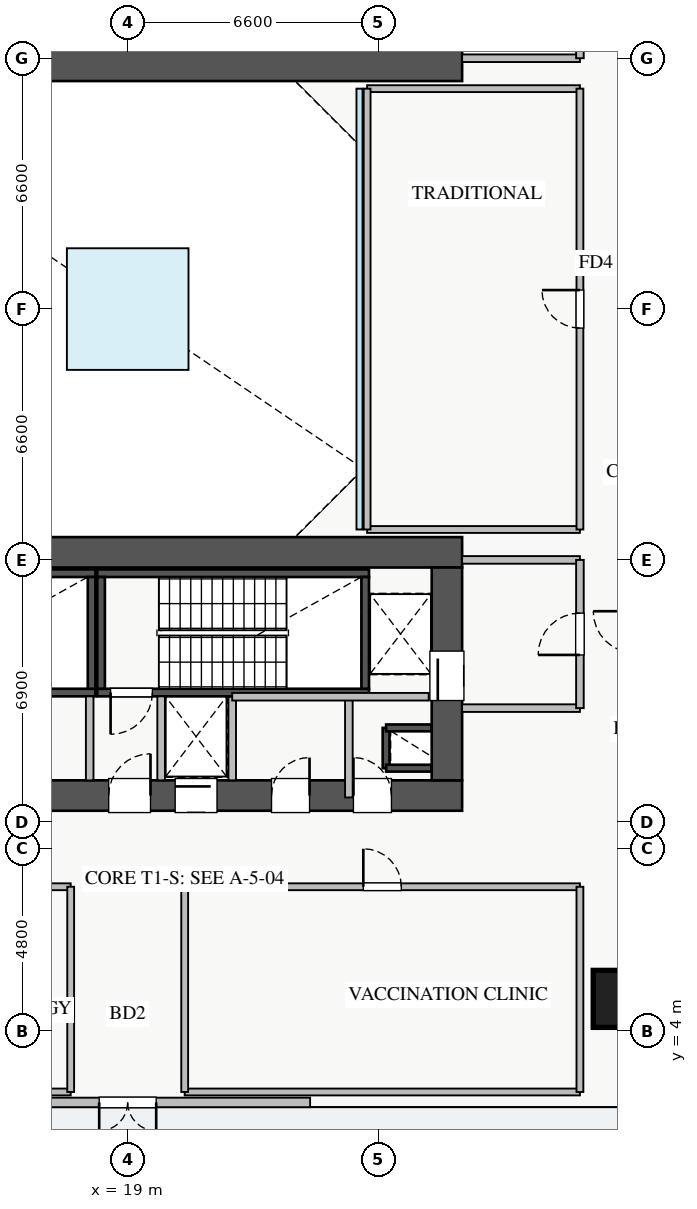
"""IFC4 building model, lengths in metres.
Left out: names, types, materials, properties, quantities, classifications, styles, units other than length and angle.
Written with IfcOpenShell. Run it as: python <this file> out.ifc"""

import sys

from ifc_helpers import new_model, si_unit, direction, frame, frame_2d, origin, origin_2d, place, context, subcontext, project, spatial, rectangle, extrude, source, transform, mapped, element, fill, save


model = new_model("IFC4")
c1 = context("Model", 3, precision=1e-05, world=origin(), true_north=direction((0.0, 1.0)))
c2 = subcontext(c1, "Body", "Model", "MODEL_VIEW")
j1 = project(units=[si_unit("LENGTHUNIT", "METRE"), si_unit("PLANEANGLEUNIT", "RADIAN")], contexts=[c1])
p1 = place(None, origin())
s1 = spatial("IfcSite", under=j1, at=p1, CompositionType="ELEMENT")
p2 = place(p1, origin())
s2 = spatial("IfcBuilding", under=s1, at=p2, CompositionType="ELEMENT")
p3 = place(p2, frame((0.0, 0.0, 5.0)))
s3 = spatial("IfcBuildingStorey", under=s2, at=p3, CompositionType="ELEMENT", Elevation=5.0)
p4 = place(p3, frame((25.8, 10.92, 0.0), z_axis=(0.0, 0.0, 1.0), x_axis=(0.0, 1.0, 0.0)))
e1 = element("IfcWall", 1, at=p4, inside=s3, PredefinedType="SHEAR", context=c2, shape_type="SweptSolid", body=[
    extrude(rectangle(XDim=1.06, YDim=0.18, at=frame_2d((0.53, 0.0))), origin(), (0.0, 0.0, 1.0), 4.18),
])
for number, where, z_axis, x_axis in (
    (2, (25.8, 11.98, 0.0), (0.0, 0.0, 1.0), (1.0, 0.0, 0.0)),
    (3, (25.8, 10.92, 0.0), (0.0, 0.0, 1.0), (1.0, 0.0, 0.0)),
):
    element("IfcWall", number, at=place(p3, frame(where, z_axis=z_axis, x_axis=x_axis)), inside=s3, PredefinedType="SHEAR", context=c2, shape_type="SweptSolid", body=[
        extrude(rectangle(XDim=1.2, YDim=0.18, at=frame_2d((0.6, 0.0))), origin(), (0.0, 0.0, 1.0), 4.18),
    ])
p5 = place(p3, frame((19.88, 12.8, 0.0), z_axis=(0.0, 0.0, 1.0), x_axis=(1.0, 0.0, 0.0)))
e4 = element("IfcWall", 4, at=p5, inside=s3, PredefinedType="SHEAR", context=c2, shape_type="SweptSolid", body=[
    extrude(rectangle(XDim=1.87, YDim=0.18, at=frame_2d((0.935, 0.0))), origin(), (0.0, 0.0, 1.0), 4.18),
])
p6 = place(p3, frame((11.0, 12.91, 0.0), z_axis=(0.0, 0.0, 1.0), x_axis=(1.0, 0.0, 0.0)))
e5 = element("IfcWall", 5, at=p6, inside=s3, PredefinedType="SHEAR", context=c2, shape_type="SweptSolid", body=[
    extrude(rectangle(XDim=7.15, YDim=0.2, at=frame_2d((3.575, 0.0))), origin(), (0.0, 0.0, 1.0), 4.4),
])
p7 = place(p6, frame((0.35, 0.0, 0.0)))
e6 = element("IfcOpeningElement", 6, at=p7, cuts=e5, PredefinedType="OPENING", context=c2, shape_type="SweptSolid", body=[
    extrude(rectangle(XDim=1.1, YDim=2.05, at=frame_2d((0.55, 1.025))), frame((0.0, 0.11, 0.0), z_axis=(0.0, -1.0, 0.0), x_axis=(1.0, 0.0, 0.0)), (0.0, 0.0, 1.0), 0.22),
])
p8 = place(p3, frame((11.0, 16.05, 0.0), z_axis=(0.0, 0.0, 1.0), x_axis=(1.0, 0.0, 0.0)))
e7 = element("IfcWall", 7, at=p8, inside=s3, PredefinedType="SHEAR", context=c2, shape_type="SweptSolid", body=[
    extrude(rectangle(XDim=7.15, YDim=0.2, at=frame_2d((3.575, 0.0))), origin(), (0.0, 0.0, 1.0), 4.4),
])
p9 = place(p3, frame((18.05, 13.01, 0.0), z_axis=(0.0, 0.0, 1.0), x_axis=(0.0, 1.0, 0.0)))
e8 = element("IfcWall", 8, at=p9, inside=s3, PredefinedType="SHEAR", context=c2, shape_type="SweptSolid", body=[
    extrude(rectangle(XDim=2.94, YDim=0.2, at=frame_2d((1.47, 0.0))), origin(), (0.0, 0.0, 1.0), 4.4),
])
p10 = place(p3, frame((18.2, 12.91, 0.0), z_axis=(0.0, 0.0, 1.0), x_axis=(1.0, 0.0, 0.0)))
e9 = element("IfcWall", 9, at=p10, inside=s3, PredefinedType="SHEAR", context=c2, shape_type="SweptSolid", body=[
    extrude(rectangle(XDim=7.15, YDim=0.2, at=frame_2d((3.575, 0.0))), origin(), (0.0, 0.0, 1.0), 4.4),
])
p11 = place(p10, frame((0.35, 0.0, 0.0)))
e10 = element("IfcOpeningElement", 10, at=p11, cuts=e9, PredefinedType="OPENING", context=c2, shape_type="SweptSolid", body=[
    extrude(rectangle(XDim=1.1, YDim=2.05, at=frame_2d((0.55, 1.025))), frame((0.0, 0.11, 0.0), z_axis=(0.0, -1.0, 0.0), x_axis=(1.0, 0.0, 0.0)), (0.0, 0.0, 1.0), 0.22),
])
p12 = place(p3, frame((18.2, 16.05, 0.0), z_axis=(0.0, 0.0, 1.0), x_axis=(1.0, 0.0, 0.0)))
e11 = element("IfcWall", 11, at=p12, inside=s3, PredefinedType="SHEAR", context=c2, shape_type="SweptSolid", body=[
    extrude(rectangle(XDim=7.15, YDim=0.2, at=frame_2d((3.575, 0.0))), origin(), (0.0, 0.0, 1.0), 4.4),
])
for number, where, z_axis, x_axis in (
    (12, (18.3, 13.01, 0.0), (0.0, 0.0, 1.0), (0.0, 1.0, 0.0)),
    (13, (25.25, 13.01, 0.0), (0.0, 0.0, 1.0), (0.0, 1.0, 0.0)),
):
    element("IfcWall", number, at=place(p3, frame(where, z_axis=z_axis, x_axis=x_axis)), inside=s3, PredefinedType="SHEAR", context=c2, shape_type="SweptSolid", body=[
        extrude(rectangle(XDim=2.94, YDim=0.2, at=frame_2d((1.47, 0.0))), origin(), (0.0, 0.0, 1.0), 4.4),
    ])
p13 = place(p3, frame((10.2, 29.4, 0.0), z_axis=(0.0, 0.0, 1.0), x_axis=(1.0, 0.0, 0.0)))
e14 = element("IfcWall", 14, at=p13, inside=s3, PredefinedType="SHEAR", context=c2, shape_type="SweptSolid", body=[
    extrude(rectangle(XDim=17.6, YDim=0.8, at=frame_2d((8.8, 0.0))), origin(), (0.0, 0.0, 1.0), 4.4),
])
p14 = place(p3, frame((10.2, 10.2, 0.0), z_axis=(0.0, 0.0, 1.0), x_axis=(1.0, 0.0, 0.0)))
e15 = element("IfcWall", 15, at=p14, inside=s3, PredefinedType="SHEAR", context=c2, shape_type="SweptSolid", body=[
    extrude(rectangle(XDim=17.6, YDim=0.8, at=frame_2d((8.8, 0.0))), origin(), (0.0, 0.0, 1.0), 4.4),
])
p15 = place(p14, frame((1.15, 0.0, 0.0)))
e16 = element("IfcOpeningElement", 16, at=p15, cuts=e15, PredefinedType="OPENING", context=c2, shape_type="SweptSolid", body=[
    extrude(rectangle(XDim=1.1, YDim=2.05, at=frame_2d((0.55, 1.025))), frame((0.0, 0.41, 0.0), z_axis=(0.0, -1.0, 0.0), x_axis=(1.0, 0.0, 0.0)), (0.0, 0.0, 1.0), 0.82),
])
p16 = place(p14, frame((8.3, 0.0, 0.0)))
e17 = element("IfcOpeningElement", 17, at=p16, cuts=e15, PredefinedType="OPENING", context=c2, shape_type="SweptSolid", body=[
    extrude(rectangle(XDim=1.1, YDim=2.05, at=frame_2d((0.55, 1.025))), frame((0.0, 0.41, 0.0), z_axis=(0.0, -1.0, 0.0), x_axis=(1.0, 0.0, 0.0)), (0.0, 0.0, 1.0), 0.82),
])
p17 = place(p14, frame((10.05, 0.0, 0.0)))
e18 = element("IfcOpeningElement", 18, at=p17, cuts=e15, PredefinedType="OPENING", context=c2, shape_type="SweptSolid", body=[
    extrude(rectangle(XDim=1.1, YDim=2.05, at=frame_2d((0.55, 1.025))), frame((0.0, 0.41, 0.0), z_axis=(0.0, -1.0, 0.0), x_axis=(1.0, 0.0, 0.0)), (0.0, 0.0, 1.0), 0.82),
])
p18 = place(p14, frame((14.74, 0.0, 0.0)))
e19 = element("IfcOpeningElement", 19, at=p18, cuts=e15, PredefinedType="OPENING", context=c2, shape_type="SweptSolid", body=[
    extrude(rectangle(XDim=1.0, YDim=2.05, at=frame_2d((0.5, 1.025))), frame((0.0, 0.41, 0.0), z_axis=(0.0, -1.0, 0.0), x_axis=(1.0, 0.0, 0.0)), (0.0, 0.0, 1.0), 0.82),
])
p19 = place(p14, frame((12.585, 0.0, 0.0)))
e20 = element("IfcOpeningElement", 20, at=p19, cuts=e15, PredefinedType="OPENING", context=c2, shape_type="SweptSolid", body=[
    extrude(rectangle(XDim=1.0, YDim=2.05, at=frame_2d((0.5, 1.025))), frame((0.0, 0.41, 0.0), z_axis=(0.0, -1.0, 0.0), x_axis=(1.0, 0.0, 0.0)), (0.0, 0.0, 1.0), 0.82),
])
p20 = place(p3, frame((10.2, 16.6, 0.0), z_axis=(0.0, 0.0, 1.0), x_axis=(1.0, 0.0, 0.0)))
e21 = element("IfcWall", 21, at=p20, inside=s3, PredefinedType="SHEAR", context=c2, shape_type="SweptSolid", body=[
    extrude(rectangle(XDim=17.6, YDim=0.8, at=frame_2d((8.8, 0.0))), origin(), (0.0, 0.0, 1.0), 4.4),
])
p21 = place(p3, frame((27.4, 10.6, 0.0), z_axis=(0.0, 0.0, 1.0), x_axis=(0.0, 1.0, 0.0)))
e22 = element("IfcWall", 22, at=p21, inside=s3, PredefinedType="SHEAR", context=c2, shape_type="SweptSolid", body=[
    extrude(rectangle(XDim=5.6, YDim=0.8, at=frame_2d((2.8, 0.0))), origin(), (0.0, 0.0, 1.0), 4.4),
])
p22 = place(p21, frame((2.1, 0.0, 0.0)))
e23 = element("IfcOpeningElement", 23, at=p22, cuts=e22, PredefinedType="OPENING", context=c2, shape_type="SweptSolid", body=[
    extrude(rectangle(XDim=1.3, YDim=2.05, at=frame_2d((0.65, 1.025))), frame((0.0, 0.41, 0.0), z_axis=(0.0, -1.0, 0.0), x_axis=(1.0, 0.0, 0.0)), (0.0, 0.0, 1.0), 0.82),
])
m1 = source(origin(), c2, "Body", "SweptSolid", [
    extrude(rectangle(XDim=1.5, YDim=1.5, at=origin_2d()), origin(), (0.0, 0.0, 1.0), 4.4),
])
p23 = place(p3, frame((32.0, 4.85, 0.0), z_axis=(0.0, 0.0, 1.0), x_axis=(1.0, 0.0, 0.0)))
e24 = element("IfcColumn", 24, at=p23, inside=s3, PredefinedType="COLUMN", context=c2, shape_type="MappedRepresentation", body=[
    mapped(m1, transform((0.0, 0.0, 0.0), x_axis=(1.0, 0.0, 0.0), y_axis=(0.0, 1.0, 0.0), z_axis=(0.0, 0.0, 1.0), scale=1.0)),
])
p24 = place(p3, frame((14.2, 2.125, 0.0), z_axis=(0.0, 0.0, 1.0), x_axis=(1.0, 0.0, 0.0)))
e25 = element("IfcWall", 25, at=p24, inside=s3, PredefinedType="STANDARD", context=c2, shape_type="SweptSolid", body=[
    extrude(rectangle(XDim=9.6, YDim=0.25, at=frame_2d((4.8, 0.0))), origin(), (0.0, 0.0, 1.0), 3.72),
])
p25 = place(p24, frame((4.05, 0.0, 0.0)))
e26 = element("IfcOpeningElement", 26, at=p25, cuts=e25, PredefinedType="OPENING", context=c2, shape_type="SweptSolid", body=[
    extrude(rectangle(XDim=1.5, YDim=2.15, at=frame_2d((0.75, 1.075))), frame((0.0, 0.135, 0.0), z_axis=(0.0, -1.0, 0.0), x_axis=(1.0, 0.0, 0.0)), (0.0, 0.0, 1.0), 0.27),
])
p26 = place(p3, frame((27.8, 29.6, 0.0), z_axis=(0.0, 0.0, 1.0), x_axis=(1.0, 0.0, 0.0)))
e27 = element("IfcWall", 27, at=p26, inside=s3, PredefinedType="PARTITIONING", context=c2, shape_type="SweptSolid", body=[
    extrude(rectangle(XDim=3.1, YDim=0.2, at=frame_2d((1.55, 0.0))), origin(), (0.0, 0.0, 1.0), 3.475),
])
p27 = place(p3, frame((30.9, 29.6, 0.0), z_axis=(0.0, 0.0, 1.0), x_axis=(0.0, 1.0, 0.0)))
e28 = element("IfcWall", 28, at=p27, inside=s3, PredefinedType="PARTITIONING", context=c2, shape_type="SweptSolid", body=[
    extrude(rectangle(XDim=3.9, YDim=0.2, at=frame_2d((1.95, 0.0))), origin(), (0.0, 0.0, 1.0), 4.18),
])
p28 = place(p27, frame((1.4, 0.0, 0.0)))
e29 = element("IfcOpeningElement", 29, at=p28, cuts=e28, PredefinedType="OPENING", context=c2, shape_type="SweptSolid", body=[
    extrude(rectangle(XDim=1.1, YDim=2.05, at=frame_2d((0.55, 1.025))), frame((0.0, 0.11, 0.0), z_axis=(0.0, -1.0, 0.0), x_axis=(1.0, 0.0, 0.0)), (0.0, 0.0, 1.0), 0.22),
])
p29 = place(p3, frame((27.8, 16.4, 0.0), z_axis=(0.0, 0.0, 1.0), x_axis=(1.0, 0.0, 0.0)))
e30 = element("IfcWall", 30, at=p29, inside=s3, PredefinedType="PARTITIONING", context=c2, shape_type="SweptSolid", body=[
    extrude(rectangle(XDim=3.1, YDim=0.2, at=frame_2d((1.55, 0.0))), origin(), (0.0, 0.0, 1.0), 3.475),
])
p30 = place(p3, frame((27.8, 12.5, 0.0), z_axis=(0.0, 0.0, 1.0), x_axis=(1.0, 0.0, 0.0)))
e31 = element("IfcWall", 31, at=p30, inside=s3, PredefinedType="PARTITIONING", context=c2, shape_type="SweptSolid", body=[
    extrude(rectangle(XDim=3.1, YDim=0.2, at=frame_2d((1.55, 0.0))), origin(), (0.0, 0.0, 1.0), 3.325),
])
p31 = place(p3, frame((30.9, 12.5, 0.0), z_axis=(0.0, 0.0, 1.0), x_axis=(0.0, 1.0, 0.0)))
e32 = element("IfcWall", 32, at=p31, inside=s3, PredefinedType="PARTITIONING", context=c2, shape_type="SweptSolid", body=[
    extrude(rectangle(XDim=3.9, YDim=0.2, at=frame_2d((1.95, 0.0))), origin(), (0.0, 0.0, 1.0), 4.18),
])
p32 = place(p31, frame((1.4, 0.0, 0.0)))
e33 = element("IfcOpeningElement", 33, at=p32, cuts=e32, PredefinedType="OPENING", context=c2, shape_type="SweptSolid", body=[
    extrude(rectangle(XDim=1.1, YDim=2.05, at=frame_2d((0.55, 1.025))), frame((0.0, 0.11, 0.0), z_axis=(0.0, -1.0, 0.0), x_axis=(1.0, 0.0, 0.0)), (0.0, 0.0, 1.0), 0.22),
])
for number, where, z_axis, x_axis in (
    (34, (18.0, 10.6, 0.0), (0.0, 0.0, 1.0), (0.0, 1.0, 0.0)),
    (35, (19.88, 10.6, 0.0), (0.0, 0.0, 1.0), (0.0, 1.0, 0.0)),
):
    element("IfcWall", number, at=place(p3, frame(where, z_axis=z_axis, x_axis=x_axis)), inside=s3, PredefinedType="PARTITIONING", context=c2, shape_type="SweptSolid", body=[
        extrude(rectangle(XDim=2.21, YDim=0.2, at=frame_2d((1.105, 0.0))), origin(), (0.0, 0.0, 1.0), 4.18),
    ])
p33 = place(p3, frame((24.82, 10.15, 0.0), z_axis=(0.0, 0.0, 1.0), x_axis=(0.0, 1.0, 0.0)))
e36 = element("IfcWall", 36, at=p33, inside=s3, PredefinedType="PARTITIONING", context=c2, shape_type="SweptSolid", body=[
    extrude(rectangle(XDim=2.65, YDim=0.2, at=frame_2d((1.325, 0.0))), origin(), (0.0, 0.0, 1.0), 4.18),
])
p34 = place(p3, frame((21.75, 10.6, 0.0), z_axis=(0.0, 0.0, 1.0), x_axis=(0.0, 1.0, 0.0)))
e37 = element("IfcWall", 37, at=p34, inside=s3, PredefinedType="PARTITIONING", context=c2, shape_type="SweptSolid", body=[
    extrude(rectangle(XDim=2.2, YDim=0.2, at=frame_2d((1.1, 0.0))), origin(), (0.0, 0.0, 1.0), 4.18),
])
p35 = place(p3, frame((21.75, 12.8, 0.0), z_axis=(0.0, 0.0, 1.0), x_axis=(1.0, 0.0, 0.0)))
e38 = element("IfcWall", 38, at=p35, inside=s3, PredefinedType="PARTITIONING", context=c2, shape_type="SweptSolid", body=[
    extrude(rectangle(XDim=5.17, YDim=0.2, at=frame_2d((2.585, 0.0))), origin(), (0.0, 0.0, 1.0), 4.18),
])
for number, where, z_axis, x_axis in (
    (39, (25.3, 17.2, 0.0), (0.0, 0.0, 1.0), (1.0, 0.0, 0.0)),
    (40, (25.3, 28.8, 0.0), (0.0, 0.0, 1.0), (1.0, 0.0, 0.0)),
):
    element("IfcWall", number, at=place(p3, frame(where, z_axis=z_axis, x_axis=x_axis)), inside=s3, PredefinedType="PARTITIONING", context=c2, shape_type="SweptSolid", body=[
        extrude(rectangle(XDim=5.6, YDim=0.18, at=frame_2d((2.8, 0.0))), origin(), (0.0, 0.0, 1.0), 4.18),
    ])
p36 = place(p3, frame((25.3, 17.2, 0.0), z_axis=(0.0, 0.0, 1.0), x_axis=(0.0, 1.0, 0.0)))
e41 = element("IfcWall", 41, at=p36, inside=s3, PredefinedType="PARTITIONING", context=c2, shape_type="SweptSolid", body=[
    extrude(rectangle(XDim=11.6, YDim=0.18, at=frame_2d((5.8, 0.0))), origin(), (0.0, 0.0, 1.0), 4.18),
])
p37 = place(p3, frame((30.9, 17.2, 0.0), z_axis=(0.0, 0.0, 1.0), x_axis=(0.0, 1.0, 0.0)))
e42 = element("IfcWall", 42, at=p37, inside=s3, PredefinedType="PARTITIONING", context=c2, shape_type="SweptSolid", body=[
    extrude(rectangle(XDim=11.6, YDim=0.18, at=frame_2d((5.8, 0.0))), origin(), (0.0, 0.0, 1.0), 4.18),
])
p38 = place(p37, frame((5.3, 0.0, 0.0)))
e43 = element("IfcOpeningElement", 43, at=p38, cuts=e42, PredefinedType="OPENING", context=c2, shape_type="SweptSolid", body=[
    extrude(rectangle(XDim=1.0, YDim=2.05, at=frame_2d((0.5, 1.025))), frame((0.0, 0.1, 0.0), z_axis=(0.0, -1.0, 0.0), x_axis=(1.0, 0.0, 0.0)), (0.0, 0.0, 1.0), 0.2),
])
p39 = place(p3, frame((10.2, 2.4, 0.0), z_axis=(0.0, 0.0, 1.0), x_axis=(1.0, 0.0, 0.0)))
e44 = element("IfcWall", 44, at=p39, inside=s3, PredefinedType="PARTITIONING", context=c2, shape_type="SweptSolid", body=[
    extrude(rectangle(XDim=7.3, YDim=0.18, at=frame_2d((3.65, 0.0))), origin(), (0.0, 0.0, 1.0), 4.18),
])
p40 = place(p3, frame((10.2, 7.8, 0.0), z_axis=(0.0, 0.0, 1.0), x_axis=(1.0, 0.0, 0.0)))
e45 = element("IfcWall", 45, at=p40, inside=s3, PredefinedType="PARTITIONING", context=c2, shape_type="SweptSolid", body=[
    extrude(rectangle(XDim=7.3, YDim=0.18, at=frame_2d((3.65, 0.0))), origin(), (0.0, 0.0, 1.0), 4.18),
])
p41 = place(p40, frame((3.15, 0.0, 0.0)))
e46 = element("IfcOpeningElement", 46, at=p41, cuts=e45, PredefinedType="OPENING", context=c2, shape_type="SweptSolid", body=[
    extrude(rectangle(XDim=1.0, YDim=2.05, at=frame_2d((0.5, 1.025))), frame((0.0, 0.1, 0.0), z_axis=(0.0, -1.0, 0.0), x_axis=(1.0, 0.0, 0.0)), (0.0, 0.0, 1.0), 0.2),
])
p42 = place(p3, frame((17.5, 2.4, 0.0), z_axis=(0.0, 0.0, 1.0), x_axis=(0.0, 1.0, 0.0)))
e47 = element("IfcWall", 47, at=p42, inside=s3, PredefinedType="PARTITIONING", context=c2, shape_type="SweptSolid", body=[
    extrude(rectangle(XDim=5.4, YDim=0.18, at=frame_2d((2.7, 0.0))), origin(), (0.0, 0.0, 1.0), 4.18),
])
p43 = place(p3, frame((20.5, 2.4, 0.0), z_axis=(0.0, 0.0, 1.0), x_axis=(1.0, 0.0, 0.0)))
e48 = element("IfcWall", 48, at=p43, inside=s3, PredefinedType="PARTITIONING", context=c2, shape_type="SweptSolid", body=[
    extrude(rectangle(XDim=10.4, YDim=0.18, at=frame_2d((5.2, 0.0))), origin(), (0.0, 0.0, 1.0), 4.18),
])
p44 = place(p3, frame((20.5, 7.8, 0.0), z_axis=(0.0, 0.0, 1.0), x_axis=(1.0, 0.0, 0.0)))
e49 = element("IfcWall", 49, at=p44, inside=s3, PredefinedType="PARTITIONING", context=c2, shape_type="SweptSolid", body=[
    extrude(rectangle(XDim=10.4, YDim=0.18, at=frame_2d((5.2, 0.0))), origin(), (0.0, 0.0, 1.0), 4.18),
])
p45 = place(p44, frame((4.7, 0.0, 0.0)))
e50 = element("IfcOpeningElement", 50, at=p45, cuts=e49, PredefinedType="OPENING", context=c2, shape_type="SweptSolid", body=[
    extrude(rectangle(XDim=1.0, YDim=2.05, at=frame_2d((0.5, 1.025))), frame((0.0, 0.1, 0.0), z_axis=(0.0, -1.0, 0.0), x_axis=(1.0, 0.0, 0.0)), (0.0, 0.0, 1.0), 0.2),
])
for number, where, z_axis, x_axis in (
    (51, (20.5, 2.4, 0.0), (0.0, 0.0, 1.0), (0.0, 1.0, 0.0)),
    (52, (30.9, 2.4, 0.0), (0.0, 0.0, 1.0), (0.0, 1.0, 0.0)),
):
    element("IfcWall", number, at=place(p3, frame(where, z_axis=z_axis, x_axis=x_axis)), inside=s3, PredefinedType="PARTITIONING", context=c2, shape_type="SweptSolid", body=[
        extrude(rectangle(XDim=5.4, YDim=0.18, at=frame_2d((2.7, 0.0))), origin(), (0.0, 0.0, 1.0), 4.18),
    ])
p46 = place(p3, frame((0.0, 0.0, -0.22)))
p47 = place(p46, frame((19.0, 23.0, 0.0)))
p48 = place(p47, frame((0.0, 0.0, 0.17)))
e53 = element("IfcWindow", 53, at=p48, inside=s3, PartitioningType="SINGLE_PANEL", PredefinedType="SKYLIGHT", context=c2, shape_type="SweptSolid", body=[
    extrude(rectangle(XDim=3.2, YDim=3.2, at=origin_2d()), origin(), (0.0, 0.0, 1.0), 0.05),
])
m2 = source(origin(), c2, "Body", "SweptSolid", [
    extrude(rectangle(XDim=1.5, YDim=2.15, at=frame_2d((0.75, 1.075))), frame((0.0, 0.025, 0.0), z_axis=(0.0, -1.0, 0.0), x_axis=(1.0, 0.0, 0.0)), (0.0, 0.0, 1.0), 0.05),
])
p49 = place(p25, frame((1.5, 0.0, 0.0), z_axis=(0.0, 0.0, 1.0), x_axis=(-1.0, 0.0, 0.0)))
e54 = element("IfcDoor", 54, at=p49, inside=s3, OperationType="DOUBLE_DOOR_SINGLE_SWING", PredefinedType="DOOR", context=c2, shape_type="MappedRepresentation", body=[
    mapped(m2, transform((0.0, 0.0, 0.0), x_axis=(1.0, 0.0, 0.0), y_axis=(0.0, 1.0, 0.0), z_axis=(0.0, 0.0, 1.0), scale=1.0)),
])
fill(e26, e54)
m3 = source(origin(), c2, "Body", "SweptSolid", [
    extrude(rectangle(XDim=1.3, YDim=2.05, at=frame_2d((0.65, 1.025))), frame((0.0, 0.025, 0.0), z_axis=(0.0, -1.0, 0.0), x_axis=(1.0, 0.0, 0.0)), (0.0, 0.0, 1.0), 0.05),
])
p50 = place(p22, origin())
e55 = element("IfcDoor", 55, at=p50, inside=s3, OperationType="SLIDING_TO_RIGHT", PredefinedType="DOOR", context=c2, shape_type="MappedRepresentation", body=[
    mapped(m3, transform((0.0, 0.0, 0.0), x_axis=(1.0, 0.0, 0.0), y_axis=(0.0, 1.0, 0.0), z_axis=(0.0, 0.0, 1.0), scale=1.0)),
])
fill(e23, e55)
m4 = source(origin(), c2, "Body", "SweptSolid", [
    extrude(rectangle(XDim=1.1, YDim=2.05, at=frame_2d((0.55, 1.025))), frame((0.0, 0.025, 0.0), z_axis=(0.0, -1.0, 0.0), x_axis=(1.0, 0.0, 0.0)), (0.0, 0.0, 1.0), 0.05),
])
p51 = place(p16, origin())
e56 = element("IfcDoor", 56, at=p51, inside=s3, OperationType="SINGLE_SWING_RIGHT", PredefinedType="DOOR", context=c2, shape_type="MappedRepresentation", body=[
    mapped(m4, transform((0.0, 0.0, 0.0), x_axis=(1.0, 0.0, 0.0), y_axis=(0.0, 1.0, 0.0), z_axis=(0.0, 0.0, 1.0), scale=1.0)),
])
fill(e17, e56)
p52 = place(p11, frame((1.1, 0.0, 0.0), z_axis=(0.0, 0.0, 1.0), x_axis=(-1.0, 0.0, 0.0)))
e57 = element("IfcDoor", 57, at=p52, inside=s3, OperationType="SINGLE_SWING_LEFT", PredefinedType="DOOR", context=c2, shape_type="MappedRepresentation", body=[
    mapped(m4, transform((0.0, 0.0, 0.0), x_axis=(1.0, 0.0, 0.0), y_axis=(0.0, 1.0, 0.0), z_axis=(0.0, 0.0, 1.0), scale=1.0)),
])
fill(e10, e57)
p53 = place(p17, origin())
e58 = element("IfcDoor", 58, at=p53, inside=s3, OperationType="SLIDING_TO_RIGHT", PredefinedType="DOOR", context=c2, shape_type="MappedRepresentation", body=[
    mapped(m4, transform((0.0, 0.0, 0.0), x_axis=(1.0, 0.0, 0.0), y_axis=(0.0, 1.0, 0.0), z_axis=(0.0, 0.0, 1.0), scale=1.0)),
])
fill(e18, e58)
m5 = source(origin(), c2, "Body", "SweptSolid", [
    extrude(rectangle(XDim=1.0, YDim=2.05, at=frame_2d((0.5, 1.025))), frame((0.0, 0.025, 0.0), z_axis=(0.0, -1.0, 0.0), x_axis=(1.0, 0.0, 0.0)), (0.0, 0.0, 1.0), 0.05),
])
p54 = place(p18, origin())
e59 = element("IfcDoor", 59, at=p54, inside=s3, OperationType="SINGLE_SWING_LEFT", PredefinedType="DOOR", context=c2, shape_type="MappedRepresentation", body=[
    mapped(m5, transform((0.0, 0.0, 0.0), x_axis=(1.0, 0.0, 0.0), y_axis=(0.0, 1.0, 0.0), z_axis=(0.0, 0.0, 1.0), scale=1.0)),
])
fill(e19, e59)
p55 = place(p19, origin())
e60 = element("IfcDoor", 60, at=p55, inside=s3, OperationType="SINGLE_SWING_RIGHT", PredefinedType="DOOR", context=c2, shape_type="MappedRepresentation", body=[
    mapped(m5, transform((0.0, 0.0, 0.0), x_axis=(1.0, 0.0, 0.0), y_axis=(0.0, 1.0, 0.0), z_axis=(0.0, 0.0, 1.0), scale=1.0)),
])
fill(e20, e60)
p56 = place(p32, origin())
e61 = element("IfcDoor", 61, at=p56, inside=s3, OperationType="SINGLE_SWING_LEFT", PredefinedType="DOOR", context=c2, shape_type="MappedRepresentation", body=[
    mapped(m4, transform((0.0, 0.0, 0.0), x_axis=(1.0, 0.0, 0.0), y_axis=(0.0, 1.0, 0.0), z_axis=(0.0, 0.0, 1.0), scale=1.0)),
])
fill(e33, e61)
p57 = place(p38, origin())
e62 = element("IfcDoor", 62, at=p57, inside=s3, OperationType="SINGLE_SWING_RIGHT", PredefinedType="DOOR", context=c2, shape_type="MappedRepresentation", body=[
    mapped(m5, transform((0.0, 0.0, 0.0), x_axis=(1.0, 0.0, 0.0), y_axis=(0.0, 1.0, 0.0), z_axis=(0.0, 0.0, 1.0), scale=1.0)),
])
fill(e43, e62)
p58 = place(p45, origin())
e63 = element("IfcDoor", 63, at=p58, inside=s3, OperationType="SINGLE_SWING_LEFT", PredefinedType="DOOR", context=c2, shape_type="MappedRepresentation", body=[
    mapped(m5, transform((0.0, 0.0, 0.0), x_axis=(1.0, 0.0, 0.0), y_axis=(0.0, 1.0, 0.0), z_axis=(0.0, 0.0, 1.0), scale=1.0)),
])
fill(e50, e63)
save(model, sys.argv[1])
